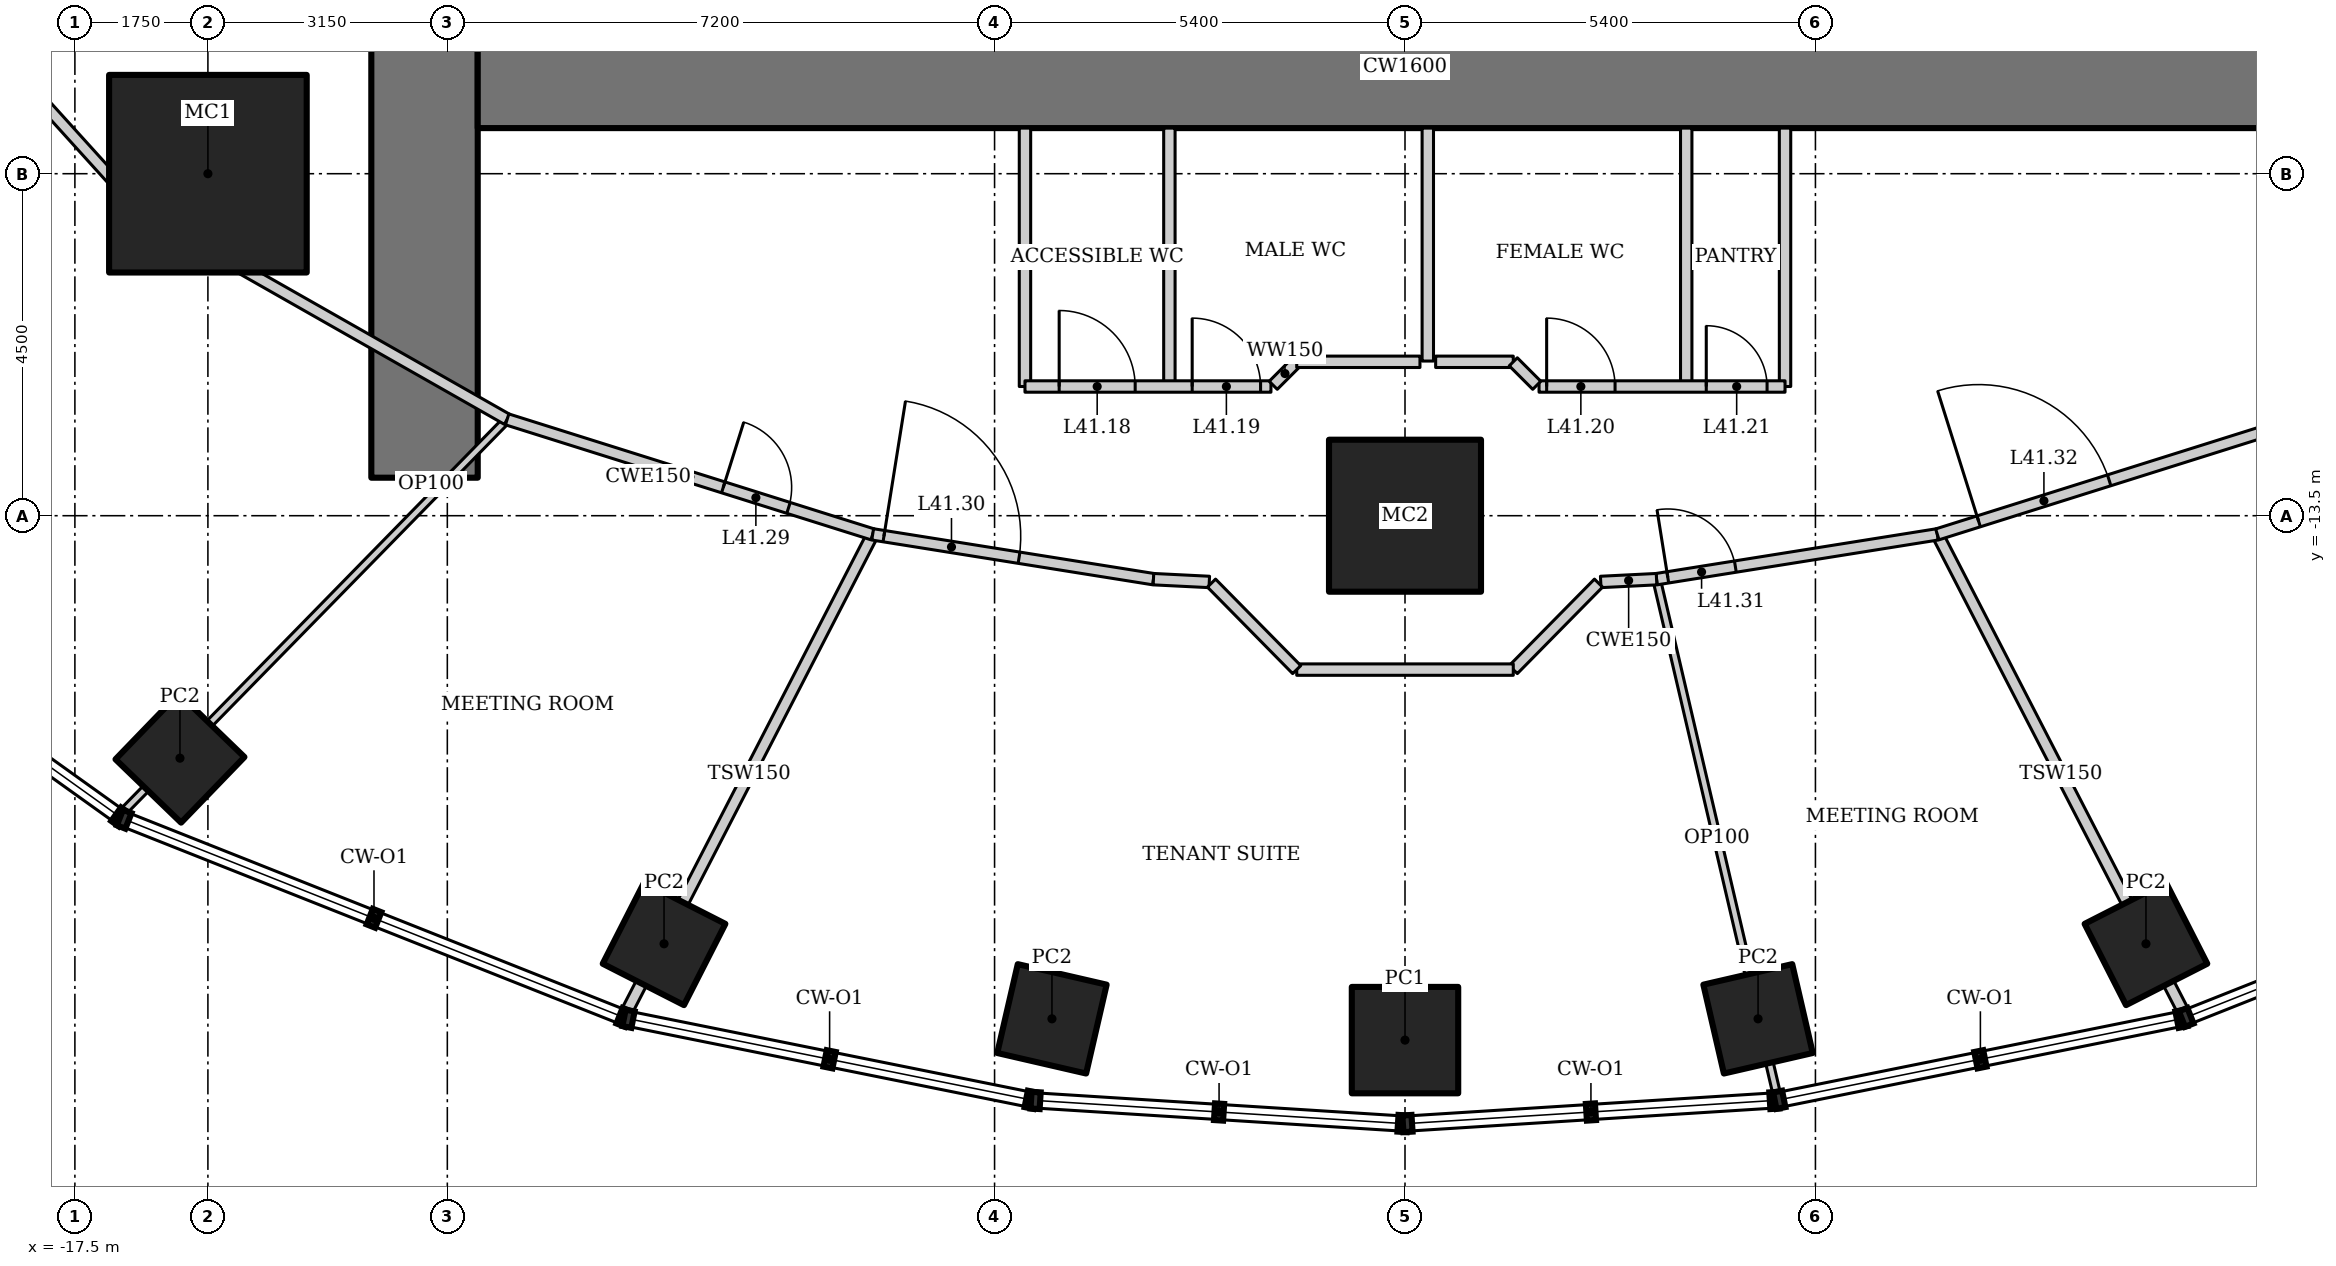
"""IFC4 building model, lengths in metres.
Left out: names, types, materials, properties, quantities, classifications, styles, units other than length and angle.
Written with IfcOpenShell. Run it as: python <this file> out.ifc"""

import sys

from ifc_helpers import new_model, si_unit, direction, frame, frame_2d, origin, origin_2d, place, context, subcontext, project, spatial, rectangle, hollow_rectangle, extrude, element, fill, save


model = new_model("IFC4")
c1 = context("Model", 3, precision=1e-05, world=origin(), true_north=direction((0.0, 1.0)))
c2 = subcontext(c1, "Body", "Model", "MODEL_VIEW")
j1 = project(units=[si_unit("LENGTHUNIT", "METRE"), si_unit("PLANEANGLEUNIT", "RADIAN")], contexts=[c1])
p1 = place(None, origin())
s1 = spatial("IfcSite", under=j1, at=p1, CompositionType="ELEMENT")
p2 = place(p1, origin())
s2 = spatial("IfcBuilding", under=s1, at=p2, CompositionType="ELEMENT")
p3 = place(p2, frame((0.0, 0.0, 176.2)))
s3 = spatial("IfcBuildingStorey", under=s2, at=p3, CompositionType="ELEMENT", Elevation=176.2)
p4 = place(p3, frame((-15.75, -9.0, 0.0), z_axis=(0.0, 0.0, 1.0), x_axis=(1.0, 0.0, 0.0)))
e1 = element("IfcColumn", 1, at=p4, inside=s3, PredefinedType="COLUMN", context=c2, shape_type="SweptSolid", body=[
    extrude(hollow_rectangle(XDim=2.6, YDim=2.6, WallThickness=0.13, at=origin_2d()), origin(), (0.0, 0.0, 1.0), 4.2),
])
p5 = place(p3, frame((0.0, -13.5, 0.0), z_axis=(0.0, 0.0, 1.0), x_axis=(1.0, 0.0, 0.0)))
e2 = element("IfcColumn", 2, at=p5, inside=s3, PredefinedType="COLUMN", context=c2, shape_type="SweptSolid", body=[
    extrude(hollow_rectangle(XDim=2.0, YDim=2.0, WallThickness=0.17, at=origin_2d()), origin(), (0.0, 0.0, 1.0), 4.2),
])
for number, where, z_axis, x_axis in (
    (3, (-16.118, -16.69, 0.0), (0.0, 0.0, 1.0), (0.695, 0.719, 0.0)),
    (4, (-9.749, -19.133, 0.0), (0.0, 0.0, 1.0), (0.454, 0.891, 0.0)),
    (5, (-4.645, -20.12, 0.0), (0.0, 0.0, 1.0), (0.225, 0.974, 0.0)),
):
    element("IfcColumn", number, at=place(p3, frame(where, z_axis=z_axis, x_axis=x_axis)), inside=s3, PredefinedType="COLUMN", context=c2, shape_type="SweptSolid", body=[
        extrude(hollow_rectangle(XDim=1.2, YDim=1.2, WallThickness=0.1, at=origin_2d()), origin(), (0.0, 0.0, 1.0), 4.2),
    ])
p6 = place(p3, frame((0.0, -20.4, 0.0), z_axis=(0.0, 0.0, 1.0), x_axis=(1.0, 0.0, 0.0)))
e6 = element("IfcColumn", 6, at=p6, inside=s3, PredefinedType="COLUMN", context=c2, shape_type="SweptSolid", body=[
    extrude(hollow_rectangle(XDim=1.4, YDim=1.4, WallThickness=0.1, at=origin_2d()), origin(), (0.0, 0.0, 1.0), 4.2),
])
for number, where, z_axis, x_axis in (
    (7, (4.645, -20.12, 0.0), (0.0, 0.0, 1.0), (0.974, 0.225, 0.0)),
    (8, (9.749, -19.133, 0.0), (0.0, 0.0, 1.0), (0.891, 0.454, 0.0)),
):
    element("IfcColumn", number, at=place(p3, frame(where, z_axis=z_axis, x_axis=x_axis)), inside=s3, PredefinedType="COLUMN", context=c2, shape_type="SweptSolid", body=[
        extrude(hollow_rectangle(XDim=1.2, YDim=1.2, WallThickness=0.1, at=origin_2d()), origin(), (0.0, 0.0, 1.0), 4.2),
    ])
p7 = place(p3, frame((-12.9, 13.0, 0.0), z_axis=(0.0, 0.0, 1.0), x_axis=(0.0, -1.0, 0.0)))
e9 = element("IfcWall", 9, at=p7, inside=s3, PredefinedType="SHEAR", context=c2, shape_type="SweptSolid", body=[
    extrude(rectangle(XDim=26.0, YDim=1.4, at=frame_2d((13.0, 0.0))), origin(), (0.0, 0.0, 1.0), 4.2),
])
p8 = place(p7, frame((12.1, 0.0, 0.0)))
e10 = element("IfcOpeningElement", 10, at=p8, cuts=e9, PredefinedType="OPENING", context=c2, shape_type="SweptSolid", body=[
    extrude(rectangle(XDim=1.8, YDim=2.1, at=frame_2d((0.9, 1.05))), frame((0.0, 0.71, 0.0), z_axis=(0.0, -1.0, 0.0), x_axis=(1.0, 0.0, 0.0)), (0.0, 0.0, 1.0), 1.42),
])
p9 = place(p3, frame((-12.2, -7.6, 0.0), z_axis=(0.0, 0.0, 1.0), x_axis=(1.0, 0.0, 0.0)))
e11 = element("IfcWall", 11, at=p9, inside=s3, PredefinedType="SHEAR", context=c2, shape_type="SweptSolid", body=[
    extrude(rectangle(XDim=24.4, YDim=1.6, at=frame_2d((12.2, 0.0))), origin(), (0.0, 0.0, 1.0), 4.2),
])
p10 = place(p3, frame((-16.882, -17.414, 0.0), z_axis=(0.0, 0.0, 1.0), x_axis=(0.699352142517, 0.714777294517, 0.0)))
e12 = element("IfcWall", 12, at=p10, inside=s3, PredefinedType="PARTITIONING", context=c2, shape_type="SweptSolid", body=[
    extrude(rectangle(XDim=7.249, YDim=0.1, at=frame_2d((3.625, 0.0))), origin(), (0.0, 0.0, 1.0), 3.321),
])
p11 = place(p3, frame((-10.253, -20.052, 0.0), z_axis=(0.0, 0.0, 1.0), x_axis=(0.458082677592, 0.888909590729, 0.0)))
e13 = element("IfcWall", 13, at=p11, inside=s3, PredefinedType="PARTITIONING", context=c2, shape_type="SweptSolid", body=[
    extrude(rectangle(XDim=7.094, YDim=0.15, at=frame_2d((3.547, 0.0))), origin(), (0.0, 0.0, 1.0), 3.349),
])
p12 = place(p3, frame((4.897, -21.135, 0.0), z_axis=(0.0, 0.0, 1.0), x_axis=(-0.22733572198, 0.973816445493, 0.0)))
e14 = element("IfcWall", 14, at=p12, inside=s3, PredefinedType="PARTITIONING", context=c2, shape_type="SweptSolid", body=[
    extrude(rectangle(XDim=6.983, YDim=0.1, at=frame_2d((3.491, 0.0))), origin(), (0.0, 0.0, 1.0), 3.293),
])
p13 = place(p3, frame((10.253, -20.052, 0.0), z_axis=(0.0, 0.0, 1.0), x_axis=(-0.458082677592, 0.888909590729, 0.0)))
e15 = element("IfcWall", 15, at=p13, inside=s3, PredefinedType="PARTITIONING", context=c2, shape_type="SweptSolid", body=[
    extrude(rectangle(XDim=7.094, YDim=0.15, at=frame_2d((3.547, 0.0))), origin(), (0.0, 0.0, 1.0), 3.349),
])
p14 = place(p3, frame((-20.577, -5.13, 0.0), z_axis=(0.0, 0.0, 1.0), x_axis=(0.671118353743, -0.741350224435, 0.0)))
e16 = element("IfcWall", 16, at=p14, inside=s3, PredefinedType="PARTITIONING", context=c2, shape_type="SweptSolid", body=[
    extrude(rectangle(XDim=5.892, YDim=0.15, at=frame_2d((2.946, 0.0))), origin(), (0.0, 0.0, 1.0), 4.05),
])
p15 = place(p14, frame((0.15, 0.0, 0.0)))
e17 = element("IfcOpeningElement", 17, at=p15, cuts=e16, PredefinedType="OPENING", context=c2, shape_type="SweptSolid", body=[
    extrude(rectangle(XDim=1.8, YDim=2.1, at=frame_2d((0.9, 1.05))), frame((0.0, 0.085, 0.0), z_axis=(0.0, -1.0, 0.0), x_axis=(1.0, 0.0, 0.0)), (0.0, 0.0, 1.0), 0.17),
])
p16 = place(p3, frame((-16.623, -9.499, 0.0), z_axis=(0.0, 0.0, 1.0), x_axis=(0.869375991036, -0.494151177485, 0.0)))
e18 = element("IfcWall", 18, at=p16, inside=s3, PredefinedType="PARTITIONING", context=c2, shape_type="SweptSolid", body=[
    extrude(rectangle(XDim=5.532, YDim=0.15, at=frame_2d((2.766, 0.0))), origin(), (0.0, 0.0, 1.0), 4.05),
])
p17 = place(p3, frame((-11.813, -12.232, 0.0), z_axis=(0.0, 0.0, 1.0), x_axis=(0.953893934057, -0.300143903101, 0.0)))
e19 = element("IfcWall", 19, at=p17, inside=s3, PredefinedType="PARTITIONING", context=c2, shape_type="SweptSolid", body=[
    extrude(rectangle(XDim=5.042, YDim=0.15, at=frame_2d((2.521, 0.0))), origin(), (0.0, 0.0, 1.0), 4.05),
])
p18 = place(p17, frame((2.98, 0.0, 0.0)))
e20 = element("IfcOpeningElement", 20, at=p18, cuts=e19, PredefinedType="OPENING", context=c2, shape_type="SweptSolid", body=[
    extrude(rectangle(XDim=0.9, YDim=2.1, at=frame_2d((0.45, 1.05))), frame((0.0, 0.085, 0.0), z_axis=(0.0, -1.0, 0.0), x_axis=(1.0, 0.0, 0.0)), (0.0, 0.0, 1.0), 0.17),
])
p19 = place(p3, frame((-7.004, -13.746, 0.0), z_axis=(0.0, 0.0, 1.0), x_axis=(0.987511396594, -0.157547585181, 0.0)))
e21 = element("IfcWall", 21, at=p19, inside=s3, PredefinedType="PARTITIONING", context=c2, shape_type="SweptSolid", body=[
    extrude(rectangle(XDim=3.741, YDim=0.15, at=frame_2d((1.87, 0.0))), origin(), (0.0, 0.0, 1.0), 4.05),
])
p20 = place(p19, frame((0.15, 0.0, 0.0)))
e22 = element("IfcOpeningElement", 22, at=p20, cuts=e21, PredefinedType="OPENING", context=c2, shape_type="SweptSolid", body=[
    extrude(rectangle(XDim=1.8, YDim=2.1, at=frame_2d((0.9, 1.05))), frame((0.0, 0.085, 0.0), z_axis=(0.0, -1.0, 0.0), x_axis=(1.0, 0.0, 0.0)), (0.0, 0.0, 1.0), 0.17),
])
p21 = place(p3, frame((3.31, -14.335, 0.0), z_axis=(0.0, 0.0, 1.0), x_axis=(0.987511396594, 0.157547585181, 0.0)))
e23 = element("IfcWall", 23, at=p21, inside=s3, PredefinedType="PARTITIONING", context=c2, shape_type="SweptSolid", body=[
    extrude(rectangle(XDim=3.741, YDim=0.15, at=frame_2d((1.87, 0.0))), origin(), (0.0, 0.0, 1.0), 4.05),
])
p22 = place(p21, frame((0.15, 0.0, 0.0)))
e24 = element("IfcOpeningElement", 24, at=p22, cuts=e23, PredefinedType="OPENING", context=c2, shape_type="SweptSolid", body=[
    extrude(rectangle(XDim=0.9, YDim=2.1, at=frame_2d((0.45, 1.05))), frame((0.0, 0.085, 0.0), z_axis=(0.0, -1.0, 0.0), x_axis=(1.0, 0.0, 0.0)), (0.0, 0.0, 1.0), 0.17),
])
p23 = place(p3, frame((7.004, -13.746, 0.0), z_axis=(0.0, 0.0, 1.0), x_axis=(0.953893934057, 0.300143903101, 0.0)))
e25 = element("IfcWall", 25, at=p23, inside=s3, PredefinedType="PARTITIONING", context=c2, shape_type="SweptSolid", body=[
    extrude(rectangle(XDim=5.042, YDim=0.15, at=frame_2d((2.521, 0.0))), origin(), (0.0, 0.0, 1.0), 4.05),
])
p24 = place(p23, frame((0.57, 0.0, 0.0)))
e26 = element("IfcOpeningElement", 26, at=p24, cuts=e25, PredefinedType="OPENING", context=c2, shape_type="SweptSolid", body=[
    extrude(rectangle(XDim=1.8, YDim=2.1, at=frame_2d((0.9, 1.05))), frame((0.0, 0.085, 0.0), z_axis=(0.0, -1.0, 0.0), x_axis=(1.0, 0.0, 0.0)), (0.0, 0.0, 1.0), 0.17),
])
for number, where, z_axis, x_axis in (
    (27, (-5.0, -8.4, 0.0), (0.0, 0.0, 1.0), (0.0, -1.0, 0.0)),
    (28, (5.0, -8.4, 0.0), (0.0, 0.0, 1.0), (0.0, -1.0, 0.0)),
    (29, (-3.1, -8.4, 0.0), (0.0, 0.0, 1.0), (0.0, -1.0, 0.0)),
    (30, (3.7, -8.4, 0.0), (0.0, 0.0, 1.0), (0.0, -1.0, 0.0)),
):
    element("IfcWall", number, at=place(p3, frame(where, z_axis=z_axis, x_axis=x_axis)), inside=s3, PredefinedType="SOLIDWALL", context=c2, shape_type="SweptSolid", body=[
        extrude(rectangle(XDim=3.4, YDim=0.15, at=frame_2d((1.7, 0.0))), origin(), (0.0, 0.0, 1.0), 4.05),
    ])
p25 = place(p3, frame((-12.9, -13.0, 0.0), z_axis=(0.0, 0.0, 1.0), x_axis=(0.714690391061, -0.699440951707, 0.0)))
e31 = element("IfcWall", 31, at=p25, inside=s3, PredefinedType="PARTITIONING", context=c2, shape_type="SweptSolid", body=[
    extrude(rectangle(XDim=0.24, YDim=0.1, at=frame_2d((0.12, 0.0))), origin(), (0.0, 0.0, 1.0), 4.05),
])
for number, where, z_axis, x_axis in (
    (32, (-3.31, -14.335, 0.0), (0.0, 0.0, 1.0), (0.999, -0.05, 0.0)),
    (33, (2.575, -14.372, 0.0), (0.0, 0.0, 1.0), (0.999, 0.05, 0.0)),
):
    element("IfcWall", number, at=place(p3, frame(where, z_axis=z_axis, x_axis=x_axis)), inside=s3, PredefinedType="PARTITIONING", context=c2, shape_type="SweptSolid", body=[
        extrude(rectangle(XDim=0.735, YDim=0.15, at=frame_2d((0.368, 0.0))), origin(), (0.0, 0.0, 1.0), 4.05),
    ])
p26 = place(p3, frame((-5.0, -11.8, 0.0), z_axis=(0.0, 0.0, 1.0), x_axis=(1.0, 0.0, 0.0)))
e34 = element("IfcWall", 34, at=p26, inside=s3, PredefinedType="SOLIDWALL", context=c2, shape_type="SweptSolid", body=[
    extrude(rectangle(XDim=3.236, YDim=0.15, at=frame_2d((1.618, 0.0))), origin(), (0.0, 0.0, 1.0), 4.05),
])
p27 = place(p26, frame((0.45, 0.0, 0.0)))
e35 = element("IfcOpeningElement", 35, at=p27, cuts=e34, PredefinedType="OPENING", context=c2, shape_type="SweptSolid", body=[
    extrude(rectangle(XDim=1.0, YDim=2.1, at=frame_2d((0.5, 1.05))), frame((0.0, 0.085, 0.0), z_axis=(0.0, -1.0, 0.0), x_axis=(1.0, 0.0, 0.0)), (0.0, 0.0, 1.0), 0.17),
])
p28 = place(p26, frame((2.2, 0.0, 0.0)))
e36 = element("IfcOpeningElement", 36, at=p28, cuts=e34, PredefinedType="OPENING", context=c2, shape_type="SweptSolid", body=[
    extrude(rectangle(XDim=0.9, YDim=2.1, at=frame_2d((0.45, 1.05))), frame((0.0, 0.085, 0.0), z_axis=(0.0, -1.0, 0.0), x_axis=(1.0, 0.0, 0.0)), (0.0, 0.0, 1.0), 0.17),
])
p29 = place(p3, frame((1.764, -11.8, 0.0), z_axis=(0.0, 0.0, 1.0), x_axis=(1.0, 0.0, 0.0)))
e37 = element("IfcWall", 37, at=p29, inside=s3, PredefinedType="SOLIDWALL", context=c2, shape_type="SweptSolid", body=[
    extrude(rectangle(XDim=3.236, YDim=0.15, at=frame_2d((1.618, 0.0))), origin(), (0.0, 0.0, 1.0), 4.05),
])
p30 = place(p29, frame((0.1, 0.0, 0.0)))
e38 = element("IfcOpeningElement", 38, at=p30, cuts=e37, PredefinedType="OPENING", context=c2, shape_type="SweptSolid", body=[
    extrude(rectangle(XDim=0.9, YDim=2.1, at=frame_2d((0.45, 1.05))), frame((0.0, 0.085, 0.0), z_axis=(0.0, -1.0, 0.0), x_axis=(1.0, 0.0, 0.0)), (0.0, 0.0, 1.0), 0.17),
])
p31 = place(p29, frame((2.2, 0.0, 0.0)))
e39 = element("IfcOpeningElement", 39, at=p31, cuts=e37, PredefinedType="OPENING", context=c2, shape_type="SweptSolid", body=[
    extrude(rectangle(XDim=0.8, YDim=2.1, at=frame_2d((0.4, 1.05))), frame((0.0, 0.085, 0.0), z_axis=(0.0, -1.0, 0.0), x_axis=(1.0, 0.0, 0.0)), (0.0, 0.0, 1.0), 0.17),
])
p32 = place(p3, frame((0.3, -8.4, 0.0), z_axis=(0.0, 0.0, 1.0), x_axis=(0.0, -1.0, 0.0)))
e40 = element("IfcWall", 40, at=p32, inside=s3, PredefinedType="SOLIDWALL", context=c2, shape_type="SweptSolid", body=[
    extrude(rectangle(XDim=3.065, YDim=0.15, at=frame_2d((1.533, 0.0))), origin(), (0.0, 0.0, 1.0), 4.05),
])
p33 = place(p3, frame((-1.734, -11.784, 0.0), z_axis=(0.0, 0.0, 1.0), x_axis=(0.707106781187, 0.707106781187, 0.0)))
e41 = element("IfcWall", 41, at=p33, inside=s3, PredefinedType="SOLIDWALL", context=c2, shape_type="SweptSolid", body=[
    extrude(rectangle(XDim=0.437, YDim=0.15, at=frame_2d((0.219, 0.0))), origin(), (0.0, 0.0, 1.0), 4.05),
])
p34 = place(p3, frame((-1.425, -11.475, 0.0), z_axis=(0.0, 0.0, 1.0), x_axis=(1.0, 0.0, 0.0)))
e42 = element("IfcWall", 42, at=p34, inside=s3, PredefinedType="SOLIDWALL", context=c2, shape_type="SweptSolid", body=[
    extrude(rectangle(XDim=1.621, YDim=0.15, at=frame_2d((0.811, 0.0))), origin(), (0.0, 0.0, 1.0), 4.05),
])
p35 = place(p3, frame((0.403, -11.475, 0.0), z_axis=(0.0, 0.0, 1.0), x_axis=(1.0, 0.0, 0.0)))
e43 = element("IfcWall", 43, at=p35, inside=s3, PredefinedType="SOLIDWALL", context=c2, shape_type="SweptSolid", body=[
    extrude(rectangle(XDim=1.021, YDim=0.15, at=frame_2d((0.511, 0.0))), origin(), (0.0, 0.0, 1.0), 4.05),
])
p36 = place(p3, frame((1.425, -11.475, 0.0), z_axis=(0.0, 0.0, 1.0), x_axis=(0.707106781187, -0.707106781187, 0.0)))
e44 = element("IfcWall", 44, at=p36, inside=s3, PredefinedType="SOLIDWALL", context=c2, shape_type="SweptSolid", body=[
    extrude(rectangle(XDim=0.437, YDim=0.15, at=frame_2d((0.219, 0.0))), origin(), (0.0, 0.0, 1.0), 4.05),
])
p37 = place(p3, frame((2.546, -14.387, 0.0), z_axis=(0.0, 0.0, 1.0), x_axis=(-0.701815492047, -0.712358768545, 0.0)))
e45 = element("IfcWall", 45, at=p37, inside=s3, PredefinedType="PARTITIONING", context=c2, shape_type="SweptSolid", body=[
    extrude(rectangle(XDim=1.598, YDim=0.15, at=frame_2d((0.799, 0.0))), origin(), (0.0, 0.0, 1.0), 4.05),
])
p38 = place(p3, frame((1.425, -15.525, 0.0), z_axis=(0.0, 0.0, 1.0), x_axis=(-1.0, 0.0, 0.0)))
e46 = element("IfcWall", 46, at=p38, inside=s3, PredefinedType="PARTITIONING", context=c2, shape_type="SweptSolid", body=[
    extrude(rectangle(XDim=2.849, YDim=0.15, at=frame_2d((1.425, 0.0))), origin(), (0.0, 0.0, 1.0), 4.05),
])
p39 = place(p3, frame((-1.425, -15.525, 0.0), z_axis=(0.0, 0.0, 1.0), x_axis=(-0.701815492047, 0.712358768545, 0.0)))
e47 = element("IfcWall", 47, at=p39, inside=s3, PredefinedType="PARTITIONING", context=c2, shape_type="SweptSolid", body=[
    extrude(rectangle(XDim=1.598, YDim=0.15, at=frame_2d((0.799, 0.0))), origin(), (0.0, 0.0, 1.0), 4.05),
])
p40 = place(p27, origin())
e48 = element("IfcDoor", 48, at=p40, inside=s3, OperationType="SINGLE_SWING_LEFT", PredefinedType="DOOR", context=c2, shape_type="SweptSolid", body=[
    extrude(rectangle(XDim=1.0, YDim=2.1, at=frame_2d((0.5, 1.05))), frame((0.0, 0.025, 0.0), z_axis=(0.0, -1.0, 0.0), x_axis=(1.0, 0.0, 0.0)), (0.0, 0.0, 1.0), 0.05),
])
fill(e35, e48)
p41 = place(p28, origin())
e49 = element("IfcDoor", 49, at=p41, inside=s3, OperationType="SINGLE_SWING_LEFT", PredefinedType="DOOR", context=c2, shape_type="SweptSolid", body=[
    extrude(rectangle(XDim=0.9, YDim=2.1, at=frame_2d((0.45, 1.05))), frame((0.0, 0.025, 0.0), z_axis=(0.0, -1.0, 0.0), x_axis=(1.0, 0.0, 0.0)), (0.0, 0.0, 1.0), 0.05),
])
fill(e36, e49)
p42 = place(p30, origin())
e50 = element("IfcDoor", 50, at=p42, inside=s3, OperationType="SINGLE_SWING_LEFT", PredefinedType="DOOR", context=c2, shape_type="SweptSolid", body=[
    extrude(rectangle(XDim=0.9, YDim=2.1, at=frame_2d((0.45, 1.05))), frame((0.0, 0.025, 0.0), z_axis=(0.0, -1.0, 0.0), x_axis=(1.0, 0.0, 0.0)), (0.0, 0.0, 1.0), 0.05),
])
fill(e38, e50)
p43 = place(p31, origin())
e51 = element("IfcDoor", 51, at=p43, inside=s3, OperationType="SINGLE_SWING_LEFT", PredefinedType="DOOR", context=c2, shape_type="SweptSolid", body=[
    extrude(rectangle(XDim=0.8, YDim=2.1, at=frame_2d((0.4, 1.05))), frame((0.0, 0.025, 0.0), z_axis=(0.0, -1.0, 0.0), x_axis=(1.0, 0.0, 0.0)), (0.0, 0.0, 1.0), 0.05),
])
fill(e39, e51)
p44 = place(p18, origin())
e52 = element("IfcDoor", 52, at=p44, inside=s3, OperationType="SINGLE_SWING_LEFT", PredefinedType="DOOR", context=c2, shape_type="SweptSolid", body=[
    extrude(rectangle(XDim=0.9, YDim=2.1, at=frame_2d((0.45, 1.05))), frame((0.0, 0.025, 0.0), z_axis=(0.0, -1.0, 0.0), x_axis=(1.0, 0.0, 0.0)), (0.0, 0.0, 1.0), 0.05),
])
fill(e20, e52)
p45 = place(p20, origin())
e53 = element("IfcDoor", 53, at=p45, inside=s3, OperationType="DOUBLE_DOOR_DOUBLE_SWING", PredefinedType="DOOR", context=c2, shape_type="SweptSolid", body=[
    extrude(rectangle(XDim=1.8, YDim=2.1, at=frame_2d((0.9, 1.05))), frame((0.0, 0.025, 0.0), z_axis=(0.0, -1.0, 0.0), x_axis=(1.0, 0.0, 0.0)), (0.0, 0.0, 1.0), 0.05),
])
fill(e22, e53)
p46 = place(p22, origin())
e54 = element("IfcDoor", 54, at=p46, inside=s3, OperationType="SINGLE_SWING_LEFT", PredefinedType="DOOR", context=c2, shape_type="SweptSolid", body=[
    extrude(rectangle(XDim=0.9, YDim=2.1, at=frame_2d((0.45, 1.05))), frame((0.0, 0.025, 0.0), z_axis=(0.0, -1.0, 0.0), x_axis=(1.0, 0.0, 0.0)), (0.0, 0.0, 1.0), 0.05),
])
fill(e24, e54)
p47 = place(p24, origin())
e55 = element("IfcDoor", 55, at=p47, inside=s3, OperationType="DOUBLE_DOOR_DOUBLE_SWING", PredefinedType="DOOR", context=c2, shape_type="SweptSolid", body=[
    extrude(rectangle(XDim=1.8, YDim=2.1, at=frame_2d((0.9, 1.05))), frame((0.0, 0.025, 0.0), z_axis=(0.0, -1.0, 0.0), x_axis=(1.0, 0.0, 0.0)), (0.0, 0.0, 1.0), 0.05),
])
fill(e26, e55)
save(model, sys.argv[1])
